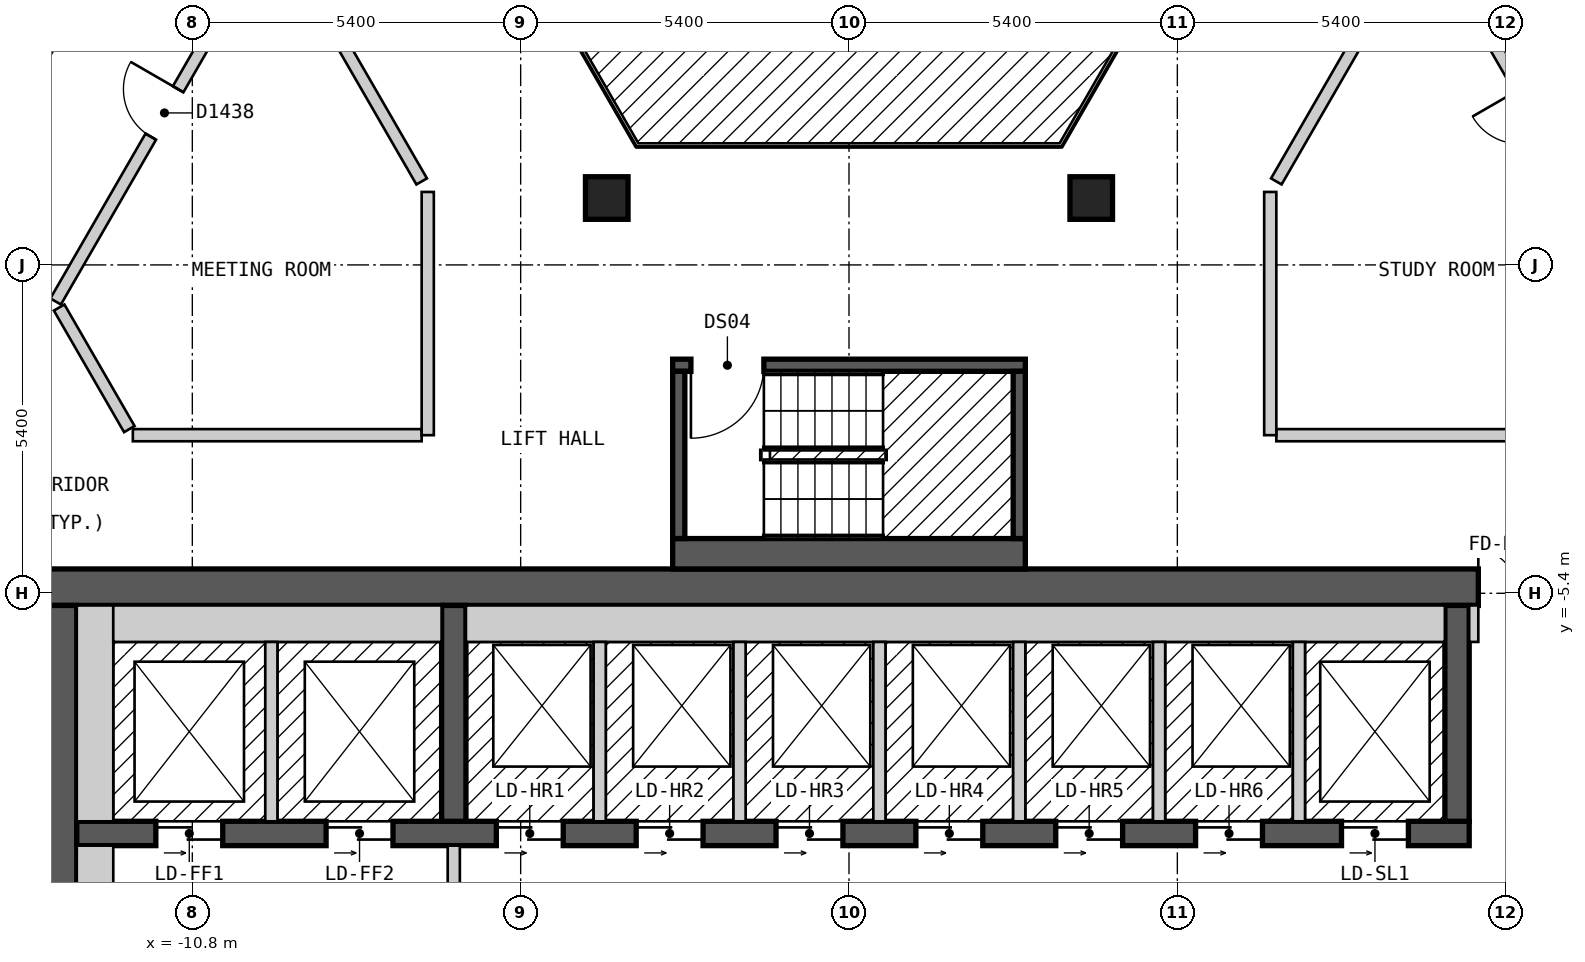
"""IFC4 building model, lengths in metres.
Left out: names, types, materials, properties, quantities, classifications, styles, units other than length and angle.
Written with IfcOpenShell. Run it as: python <this file> out.ifc"""

import sys

from ifc_helpers import new_model, si_unit, direction, frame, frame_2d, origin, origin_2d, place, context, subcontext, project, spatial, rectangle, extrude, element, fill, save


model = new_model("IFC4")
c1 = context("Model", 3, precision=1e-05, world=origin(), true_north=direction((0.0, 1.0)))
c2 = subcontext(c1, "Body", "Model", "MODEL_VIEW")
j1 = project(units=[si_unit("LENGTHUNIT", "METRE"), si_unit("PLANEANGLEUNIT", "RADIAN")], contexts=[c1])
p1 = place(None, origin())
s1 = spatial("IfcSite", under=j1, at=p1, CompositionType="ELEMENT")
p2 = place(p1, origin())
s2 = spatial("IfcBuilding", under=s1, at=p2, CompositionType="ELEMENT")
p3 = place(p2, frame((0.0, 0.0, 178.2)))
s3 = spatial("IfcBuildingStorey", under=s2, at=p3, CompositionType="ELEMENT", Elevation=178.2)
for number, where, z_axis, x_axis in (
    (1, (3.984, 1.1, 0.0), (0.0, 0.0, 1.0), (1.0, 0.0, 0.0)),
    (2, (-3.984, 1.1, 0.0), (0.0, 0.0, 1.0), (1.0, 0.0, 0.0)),
):
    element("IfcColumn", number, at=place(p3, frame(where, z_axis=z_axis, x_axis=x_axis)), inside=s3, PredefinedType="COLUMN", context=c2, shape_type="SweptSolid", body=[
        extrude(rectangle(XDim=0.7, YDim=0.7, at=origin_2d()), origin(), (0.0, 0.0, 1.0), 3.0),
    ])
p4 = place(p3, frame((-13.3, -5.3, 0.0), z_axis=(0.0, 0.0, 1.0), x_axis=(1.0, 0.0, 0.0)))
e3 = element("IfcWall", 3, at=p4, inside=s3, PredefinedType="SHEAR", context=c2, shape_type="SweptSolid", body=[
    extrude(rectangle(XDim=26.6, YDim=0.6, at=frame_2d((13.3, 0.0))), origin(), (0.0, 0.0, 1.0), 2.7),
])
p5 = place(p4, frame((23.65, 0.0, 0.0)))
e4 = element("IfcOpeningElement", 4, at=p5, cuts=e3, PredefinedType="OPENING", context=c2, shape_type="SweptSolid", body=[
    extrude(rectangle(XDim=1.2, YDim=2.1, at=frame_2d((0.6, 1.05))), frame((0.0, 0.31, 0.0), z_axis=(0.0, -1.0, 0.0), x_axis=(1.0, 0.0, 0.0)), (0.0, 0.0, 1.0), 0.62),
])
p6 = place(p3, frame((-13.0, -18.4, 0.0), z_axis=(0.0, 0.0, 1.0), x_axis=(0.0, 1.0, 0.0)))
e5 = element("IfcWall", 5, at=p6, inside=s3, PredefinedType="SHEAR", context=c2, shape_type="SweptSolid", body=[
    extrude(rectangle(XDim=12.8, YDim=0.6, at=frame_2d((6.4, 0.0))), origin(), (0.0, 0.0, 1.0), 2.7),
])
p7 = place(p6, frame((4.2, 0.0, 0.0)))
e6 = element("IfcOpeningElement", 6, at=p7, cuts=e5, PredefinedType="OPENING", context=c2, shape_type="SweptSolid", body=[
    extrude(rectangle(XDim=1.2, YDim=2.1, at=frame_2d((0.6, 1.05))), frame((0.0, 0.31, 0.0), z_axis=(0.0, -1.0, 0.0), x_axis=(1.0, 0.0, 0.0)), (0.0, 0.0, 1.0), 0.62),
])
p8 = place(p3, frame((-12.7, -9.35, 0.0), z_axis=(0.0, 0.0, 1.0), x_axis=(1.0, 0.0, 0.0)))
e7 = element("IfcWall", 7, at=p8, inside=s3, PredefinedType="SHEAR", context=c2, shape_type="SweptSolid", body=[
    extrude(rectangle(XDim=22.9, YDim=0.4, at=frame_2d((11.45, 0.0))), origin(), (0.0, 0.0, 1.0), 2.7),
])
p9 = place(p8, frame((1.3, 0.0, 0.0)))
e8 = element("IfcOpeningElement", 8, at=p9, cuts=e7, PredefinedType="OPENING", context=c2, shape_type="SweptSolid", body=[
    extrude(rectangle(XDim=1.1, YDim=2.1, at=frame_2d((0.55, 1.05))), frame((0.0, 0.21, 0.0), z_axis=(0.0, -1.0, 0.0), x_axis=(1.0, 0.0, 0.0)), (0.0, 0.0, 1.0), 0.42),
])
p10 = place(p8, frame((4.1, 0.0, 0.0)))
e9 = element("IfcOpeningElement", 9, at=p10, cuts=e7, PredefinedType="OPENING", context=c2, shape_type="SweptSolid", body=[
    extrude(rectangle(XDim=1.1, YDim=2.1, at=frame_2d((0.55, 1.05))), frame((0.0, 0.21, 0.0), z_axis=(0.0, -1.0, 0.0), x_axis=(1.0, 0.0, 0.0)), (0.0, 0.0, 1.0), 0.42),
])
p11 = place(p8, frame((6.9, 0.0, 0.0)))
e10 = element("IfcOpeningElement", 10, at=p11, cuts=e7, PredefinedType="OPENING", context=c2, shape_type="SweptSolid", body=[
    extrude(rectangle(XDim=1.1, YDim=2.1, at=frame_2d((0.55, 1.05))), frame((0.0, 0.21, 0.0), z_axis=(0.0, -1.0, 0.0), x_axis=(1.0, 0.0, 0.0)), (0.0, 0.0, 1.0), 0.42),
])
p12 = place(p8, frame((9.2, 0.0, 0.0)))
e11 = element("IfcOpeningElement", 11, at=p12, cuts=e7, PredefinedType="OPENING", context=c2, shape_type="SweptSolid", body=[
    extrude(rectangle(XDim=1.1, YDim=2.1, at=frame_2d((0.55, 1.05))), frame((0.0, 0.21, 0.0), z_axis=(0.0, -1.0, 0.0), x_axis=(1.0, 0.0, 0.0)), (0.0, 0.0, 1.0), 0.42),
])
p13 = place(p8, frame((11.5, 0.0, 0.0)))
e12 = element("IfcOpeningElement", 12, at=p13, cuts=e7, PredefinedType="OPENING", context=c2, shape_type="SweptSolid", body=[
    extrude(rectangle(XDim=1.1, YDim=2.1, at=frame_2d((0.55, 1.05))), frame((0.0, 0.21, 0.0), z_axis=(0.0, -1.0, 0.0), x_axis=(1.0, 0.0, 0.0)), (0.0, 0.0, 1.0), 0.42),
])
p14 = place(p8, frame((13.8, 0.0, 0.0)))
e13 = element("IfcOpeningElement", 13, at=p14, cuts=e7, PredefinedType="OPENING", context=c2, shape_type="SweptSolid", body=[
    extrude(rectangle(XDim=1.1, YDim=2.1, at=frame_2d((0.55, 1.05))), frame((0.0, 0.21, 0.0), z_axis=(0.0, -1.0, 0.0), x_axis=(1.0, 0.0, 0.0)), (0.0, 0.0, 1.0), 0.42),
])
p15 = place(p8, frame((16.1, 0.0, 0.0)))
e14 = element("IfcOpeningElement", 14, at=p15, cuts=e7, PredefinedType="OPENING", context=c2, shape_type="SweptSolid", body=[
    extrude(rectangle(XDim=1.1, YDim=2.1, at=frame_2d((0.55, 1.05))), frame((0.0, 0.21, 0.0), z_axis=(0.0, -1.0, 0.0), x_axis=(1.0, 0.0, 0.0)), (0.0, 0.0, 1.0), 0.42),
])
p16 = place(p8, frame((18.4, 0.0, 0.0)))
e15 = element("IfcOpeningElement", 15, at=p16, cuts=e7, PredefinedType="OPENING", context=c2, shape_type="SweptSolid", body=[
    extrude(rectangle(XDim=1.1, YDim=2.1, at=frame_2d((0.55, 1.05))), frame((0.0, 0.21, 0.0), z_axis=(0.0, -1.0, 0.0), x_axis=(1.0, 0.0, 0.0)), (0.0, 0.0, 1.0), 0.42),
])
p17 = place(p8, frame((20.8, 0.0, 0.0)))
e16 = element("IfcOpeningElement", 16, at=p17, cuts=e7, PredefinedType="OPENING", context=c2, shape_type="SweptSolid", body=[
    extrude(rectangle(XDim=1.1, YDim=2.1, at=frame_2d((0.55, 1.05))), frame((0.0, 0.21, 0.0), z_axis=(0.0, -1.0, 0.0), x_axis=(1.0, 0.0, 0.0)), (0.0, 0.0, 1.0), 0.42),
])
for number, where, z_axis, x_axis in (
    (17, (-6.5, -9.15, 0.0), (0.0, 0.0, 1.0), (0.0, 1.0, 0.0)),
    (18, (10.0, -9.15, 0.0), (0.0, 0.0, 1.0), (0.0, 1.0, 0.0)),
):
    element("IfcWall", number, at=place(p3, frame(where, z_axis=z_axis, x_axis=x_axis)), inside=s3, PredefinedType="SHEAR", context=c2, shape_type="SweptSolid", body=[
        extrude(rectangle(XDim=3.55, YDim=0.4, at=frame_2d((1.775, 0.0))), origin(), (0.0, 0.0, 1.0), 2.7),
    ])
p18 = place(p3, frame((-2.9, -4.75, 0.0), z_axis=(0.0, 0.0, 1.0), x_axis=(1.0, 0.0, 0.0)))
e19 = element("IfcWall", 19, at=p18, inside=s3, PredefinedType="SOLIDWALL", context=c2, shape_type="SweptSolid", body=[
    extrude(rectangle(XDim=5.8, YDim=0.5, at=frame_2d((2.9, 0.0))), origin(), (0.0, 0.0, 1.0), 2.7),
])
p19 = place(p3, frame((-2.9, -1.65, 0.0), z_axis=(0.0, 0.0, 1.0), x_axis=(1.0, 0.0, 0.0)))
e20 = element("IfcWall", 20, at=p19, inside=s3, PredefinedType="SOLIDWALL", context=c2, shape_type="SweptSolid", body=[
    extrude(rectangle(XDim=5.8, YDim=0.2, at=frame_2d((2.9, 0.0))), origin(), (0.0, 0.0, 1.0), 2.7),
])
p20 = place(p19, frame((0.3, 0.0, 0.0)))
e21 = element("IfcOpeningElement", 21, at=p20, cuts=e20, PredefinedType="OPENING", context=c2, shape_type="SweptSolid", body=[
    extrude(rectangle(XDim=1.2, YDim=2.1, at=frame_2d((0.6, 1.05))), frame((0.0, 0.11, 0.0), z_axis=(0.0, -1.0, 0.0), x_axis=(1.0, 0.0, 0.0)), (0.0, 0.0, 1.0), 0.22),
])
for number, where, z_axis, x_axis in (
    (22, (-2.8, -4.5, 0.0), (0.0, 0.0, 1.0), (0.0, 1.0, 0.0)),
    (23, (2.8, -4.5, 0.0), (0.0, 0.0, 1.0), (0.0, 1.0, 0.0)),
):
    element("IfcWall", number, at=place(p3, frame(where, z_axis=z_axis, x_axis=x_axis)), inside=s3, PredefinedType="SOLIDWALL", context=c2, shape_type="SweptSolid", body=[
        extrude(rectangle(XDim=2.75, YDim=0.2, at=frame_2d((1.375, 0.0))), origin(), (0.0, 0.0, 1.0), 2.7),
    ])
p21 = place(p3, frame((-9.411, 5.5, 0.0), z_axis=(0.0, 0.0, 1.0), x_axis=(0.500018099276, -0.86601495391, 0.0)))
e24 = element("IfcWall", 24, at=p21, inside=s3, PredefinedType="PARTITIONING", context=c2, shape_type="SweptSolid", body=[
    extrude(rectangle(XDim=4.765, YDim=0.2, at=frame_2d((2.383, 0.0))), origin(), (0.0, 0.0, 1.0), 2.7),
])
p22 = place(p3, frame((-12.99, -0.701, 0.0), z_axis=(0.0, 0.0, 1.0), x_axis=(0.499972710878, -0.866041158593, 0.0)))
e25 = element("IfcWall", 25, at=p22, inside=s3, PredefinedType="PARTITIONING", context=c2, shape_type="SweptSolid", body=[
    extrude(rectangle(XDim=2.308, YDim=0.2, at=frame_2d((1.154, 0.0))), origin(), (0.0, 0.0, 1.0), 2.7),
])
p23 = place(p3, frame((9.469, 5.6, 0.0), z_axis=(0.0, 0.0, 1.0), x_axis=(0.499964524401, -0.866045884662, 0.0)))
e26 = element("IfcWall", 26, at=p23, inside=s3, PredefinedType="PARTITIONING", context=c2, shape_type="SweptSolid", body=[
    extrude(rectangle(XDim=7.042, YDim=0.2, at=frame_2d((3.521, 0.0))), origin(), (0.0, 0.0, 1.0), 2.7),
])
p24 = place(p23, frame((3.129, 0.0, 0.0)))
e27 = element("IfcOpeningElement", 27, at=p24, cuts=e26, PredefinedType="OPENING", context=c2, shape_type="SweptSolid", body=[
    extrude(rectangle(XDim=0.9, YDim=2.1, at=frame_2d((0.45, 1.05))), frame((0.0, 0.11, 0.0), z_axis=(0.0, -1.0, 0.0), x_axis=(1.0, 0.0, 0.0)), (0.0, 0.0, 1.0), 0.22),
])
p25 = place(p3, frame((10.739, 7.8, 0.0), z_axis=(0.0, 0.0, 1.0), x_axis=(0.499964311759, -0.86604600742, 0.0)))
e28 = element("IfcWall", 28, at=p25, inside=s3, PredefinedType="PARTITIONING", context=c2, shape_type="SweptSolid", body=[
    extrude(rectangle(XDim=9.583, YDim=0.2, at=frame_2d((4.792, 0.0))), origin(), (0.0, 0.0, 1.0), 2.7),
])
p26 = place(p3, frame((-11.778, -2.8, 0.0), z_axis=(0.0, 0.0, 1.0), x_axis=(1.0, 0.0, 0.0)))
e29 = element("IfcWall", 29, at=p26, inside=s3, PredefinedType="PARTITIONING", context=c2, shape_type="SweptSolid", body=[
    extrude(rectangle(XDim=4.75, YDim=0.2, at=frame_2d((2.375, 0.0))), origin(), (0.0, 0.0, 1.0), 2.7),
])
p27 = place(p3, frame((7.028, -2.8, 0.0), z_axis=(0.0, 0.0, 1.0), x_axis=(1.0, 0.0, 0.0)))
e30 = element("IfcWall", 30, at=p27, inside=s3, PredefinedType="PARTITIONING", context=c2, shape_type="SweptSolid", body=[
    extrude(rectangle(XDim=4.634, YDim=0.2, at=frame_2d((2.317, 0.0))), origin(), (0.0, 0.0, 1.0), 2.7),
])
p28 = place(p3, frame((7.028, 1.373, 0.0), z_axis=(0.0, 0.0, 1.0), x_axis=(0.499953126767, 0.866052464367, 0.0)))
e31 = element("IfcWall", 31, at=p28, inside=s3, PredefinedType="PARTITIONING", context=c2, shape_type="SweptSolid", body=[
    extrude(rectangle(XDim=4.764, YDim=0.2, at=frame_2d((2.382, 0.0))), origin(), (0.0, 0.0, 1.0), 2.7),
])
p29 = place(p3, frame((-13.048, -0.601, 0.0), z_axis=(0.0, 0.0, 1.0), x_axis=(0.499982180423, 0.866035691677, 0.0)))
e32 = element("IfcWall", 32, at=p29, inside=s3, PredefinedType="PARTITIONING", context=c2, shape_type="SweptSolid", body=[
    extrude(rectangle(XDim=7.16, YDim=0.2, at=frame_2d((3.58, 0.0))), origin(), (0.0, 0.0, 1.0), 2.7),
])
p30 = place(p29, frame((3.13, 0.0, 0.0)))
e33 = element("IfcOpeningElement", 33, at=p30, cuts=e32, PredefinedType="OPENING", context=c2, shape_type="SweptSolid", body=[
    extrude(rectangle(XDim=0.9, YDim=2.1, at=frame_2d((0.45, 1.05))), frame((0.0, 0.11, 0.0), z_axis=(0.0, -1.0, 0.0), x_axis=(1.0, 0.0, 0.0)), (0.0, 0.0, 1.0), 0.22),
])
p31 = place(p3, frame((-15.53, -0.501, 0.0), z_axis=(0.0, 0.0, 1.0), x_axis=(0.499952498232, 0.866052827206, 0.0)))
e34 = element("IfcWall", 34, at=p31, inside=s3, PredefinedType="PARTITIONING", context=c2, shape_type="SweptSolid", body=[
    extrude(rectangle(XDim=9.585, YDim=0.2, at=frame_2d((4.792, 0.0))), origin(), (0.0, 0.0, 1.0), 2.7),
])
for number, where, z_axis, x_axis in (
    (35, (6.928, -2.8, 0.0), (0.0, 0.0, 1.0), (0.0, 1.0, 0.0)),
    (36, (-6.928, -2.8, 0.0), (0.0, 0.0, 1.0), (0.0, 1.0, 0.0)),
):
    element("IfcWall", number, at=place(p3, frame(where, z_axis=z_axis, x_axis=x_axis)), inside=s3, PredefinedType="PARTITIONING", context=c2, shape_type="SweptSolid", body=[
        extrude(rectangle(XDim=4.0, YDim=0.2, at=frame_2d((2.0, 0.0))), origin(), (0.0, 0.0, 1.0), 2.7),
    ])
p32 = place(p3, frame((-12.4, -13.0, 0.0), z_axis=(0.0, 0.0, 1.0), x_axis=(0.0, 1.0, 0.0)))
e37 = element("IfcWall", 37, at=p32, inside=s3, PredefinedType="PARTITIONING", context=c2, shape_type="SweptSolid", body=[
    extrude(rectangle(XDim=3.45, YDim=0.6, at=frame_2d((1.725, 0.0))), origin(), (0.0, 0.0, 1.0), 2.7),
])
p33 = place(p3, frame((-12.4, -9.15, 0.0), z_axis=(0.0, 0.0, 1.0), x_axis=(0.0, 1.0, 0.0)))
e38 = element("IfcWall", 38, at=p33, inside=s3, PredefinedType="SOLIDWALL", context=c2, shape_type="SweptSolid", body=[
    extrude(rectangle(XDim=3.55, YDim=0.6, at=frame_2d((1.775, 0.0))), origin(), (0.0, 0.0, 1.0), 2.7),
])
p34 = place(p3, frame((-12.1, -5.9, 0.0), z_axis=(0.0, 0.0, 1.0), x_axis=(1.0, 0.0, 0.0)))
e39 = element("IfcWall", 39, at=p34, inside=s3, PredefinedType="SOLIDWALL", context=c2, shape_type="SweptSolid", body=[
    extrude(rectangle(XDim=5.4, YDim=0.6, at=frame_2d((2.7, 0.0))), origin(), (0.0, 0.0, 1.0), 2.7),
])
p35 = place(p3, frame((-9.5, -9.15, 0.0), z_axis=(0.0, 0.0, 1.0), x_axis=(0.0, 1.0, 0.0)))
e40 = element("IfcWall", 40, at=p35, inside=s3, PredefinedType="SOLIDWALL", context=c2, shape_type="SweptSolid", body=[
    extrude(rectangle(XDim=2.95, YDim=0.2, at=frame_2d((1.475, 0.0))), origin(), (0.0, 0.0, 1.0), 2.7),
])
p36 = place(p3, frame((-6.5, -14.45, 0.0), z_axis=(0.0, 0.0, 1.0), x_axis=(0.0, 1.0, 0.0)))
e41 = element("IfcWall", 41, at=p36, inside=s3, PredefinedType="PARTITIONING", context=c2, shape_type="SweptSolid", body=[
    extrude(rectangle(XDim=4.9, YDim=0.2, at=frame_2d((2.45, 0.0))), origin(), (0.0, 0.0, 1.0), 2.7),
])
p37 = place(p36, frame((3.15, 0.0, 0.0), z_axis=(0.0, 0.0, 1.0), x_axis=(-1.0, 0.0, 0.0)))
e42 = element("IfcOpeningElement", 42, at=p37, cuts=e41, PredefinedType="OPENING", context=c2, shape_type="SweptSolid", body=[
    extrude(rectangle(XDim=1.4, YDim=2.1, at=frame_2d((0.7, 1.05))), frame((0.0, 0.11, 0.0), z_axis=(0.0, -1.0, 0.0), x_axis=(1.0, 0.0, 0.0)), (0.0, 0.0, 1.0), 0.22),
])
p38 = place(p3, frame((-6.3, -5.9, 0.0), z_axis=(0.0, 0.0, 1.0), x_axis=(1.0, 0.0, 0.0)))
e43 = element("IfcWall", 43, at=p38, inside=s3, PredefinedType="SOLIDWALL", context=c2, shape_type="SweptSolid", body=[
    extrude(rectangle(XDim=16.1, YDim=0.6, at=frame_2d((8.05, 0.0))), origin(), (0.0, 0.0, 1.0), 2.7),
])
for number, where, z_axis, x_axis in (
    (44, (-4.1, -9.15, 0.0), (0.0, 0.0, 1.0), (0.0, 1.0, 0.0)),
    (45, (-1.8, -9.15, 0.0), (0.0, 0.0, 1.0), (0.0, 1.0, 0.0)),
    (46, (0.5, -9.15, 0.0), (0.0, 0.0, 1.0), (0.0, 1.0, 0.0)),
    (47, (2.8, -9.15, 0.0), (0.0, 0.0, 1.0), (0.0, 1.0, 0.0)),
    (48, (5.1, -9.15, 0.0), (0.0, 0.0, 1.0), (0.0, 1.0, 0.0)),
    (49, (7.4, -9.15, 0.0), (0.0, 0.0, 1.0), (0.0, 1.0, 0.0)),
):
    element("IfcWall", number, at=place(p3, frame(where, z_axis=z_axis, x_axis=x_axis)), inside=s3, PredefinedType="SOLIDWALL", context=c2, shape_type="SweptSolid", body=[
        extrude(rectangle(XDim=2.95, YDim=0.2, at=frame_2d((1.475, 0.0))), origin(), (0.0, 0.0, 1.0), 2.7),
    ])
p39 = place(p3, frame((10.275, -6.2, 0.0), z_axis=(0.0, 0.0, 1.0), x_axis=(0.0, 1.0, 0.0)))
e50 = element("IfcWall", 50, at=p39, inside=s3, PredefinedType="PARTITIONING", context=c2, shape_type="SweptSolid", body=[
    extrude(rectangle(XDim=0.6, YDim=0.15, at=frame_2d((0.3, 0.0))), origin(), (0.0, 0.0, 1.0), 2.7),
])
p40 = place(p20, origin())
e51 = element("IfcDoor", 51, at=p40, inside=s3, OperationType="SINGLE_SWING_LEFT", PredefinedType="DOOR", context=c2, shape_type="SweptSolid", body=[
    extrude(rectangle(XDim=1.2, YDim=2.1, at=frame_2d((0.6, 1.05))), frame((0.0, 0.025, 0.0), z_axis=(0.0, -1.0, 0.0), x_axis=(1.0, 0.0, 0.0)), (0.0, 0.0, 1.0), 0.05),
])
fill(e21, e51)
p41 = place(p30, origin())
e52 = element("IfcDoor", 52, at=p41, inside=s3, OperationType="SINGLE_SWING_RIGHT", PredefinedType="DOOR", context=c2, shape_type="SweptSolid", body=[
    extrude(rectangle(XDim=0.9, YDim=2.1, at=frame_2d((0.45, 1.05))), frame((0.0, 0.025, 0.0), z_axis=(0.0, -1.0, 0.0), x_axis=(1.0, 0.0, 0.0)), (0.0, 0.0, 1.0), 0.05),
])
fill(e33, e52)
p42 = place(p9, origin())
e53 = element("IfcDoor", 53, at=p42, inside=s3, OperationType="DOUBLE_DOOR_SLIDING", PredefinedType="DOOR", context=c2, shape_type="SweptSolid", body=[
    extrude(rectangle(XDim=1.1, YDim=2.1, at=frame_2d((0.55, 1.05))), frame((0.0, 0.025, 0.0), z_axis=(0.0, -1.0, 0.0), x_axis=(1.0, 0.0, 0.0)), (0.0, 0.0, 1.0), 0.05),
])
fill(e8, e53)
p43 = place(p10, origin())
e54 = element("IfcDoor", 54, at=p43, inside=s3, OperationType="DOUBLE_DOOR_SLIDING", PredefinedType="DOOR", context=c2, shape_type="SweptSolid", body=[
    extrude(rectangle(XDim=1.1, YDim=2.1, at=frame_2d((0.55, 1.05))), frame((0.0, 0.025, 0.0), z_axis=(0.0, -1.0, 0.0), x_axis=(1.0, 0.0, 0.0)), (0.0, 0.0, 1.0), 0.05),
])
fill(e9, e54)
p44 = place(p11, origin())
e55 = element("IfcDoor", 55, at=p44, inside=s3, OperationType="DOUBLE_DOOR_SLIDING", PredefinedType="DOOR", context=c2, shape_type="SweptSolid", body=[
    extrude(rectangle(XDim=1.1, YDim=2.1, at=frame_2d((0.55, 1.05))), frame((0.0, 0.025, 0.0), z_axis=(0.0, -1.0, 0.0), x_axis=(1.0, 0.0, 0.0)), (0.0, 0.0, 1.0), 0.05),
])
fill(e10, e55)
p45 = place(p12, origin())
e56 = element("IfcDoor", 56, at=p45, inside=s3, OperationType="DOUBLE_DOOR_SLIDING", PredefinedType="DOOR", context=c2, shape_type="SweptSolid", body=[
    extrude(rectangle(XDim=1.1, YDim=2.1, at=frame_2d((0.55, 1.05))), frame((0.0, 0.025, 0.0), z_axis=(0.0, -1.0, 0.0), x_axis=(1.0, 0.0, 0.0)), (0.0, 0.0, 1.0), 0.05),
])
fill(e11, e56)
p46 = place(p13, origin())
e57 = element("IfcDoor", 57, at=p46, inside=s3, OperationType="DOUBLE_DOOR_SLIDING", PredefinedType="DOOR", context=c2, shape_type="SweptSolid", body=[
    extrude(rectangle(XDim=1.1, YDim=2.1, at=frame_2d((0.55, 1.05))), frame((0.0, 0.025, 0.0), z_axis=(0.0, -1.0, 0.0), x_axis=(1.0, 0.0, 0.0)), (0.0, 0.0, 1.0), 0.05),
])
fill(e12, e57)
p47 = place(p14, origin())
e58 = element("IfcDoor", 58, at=p47, inside=s3, OperationType="DOUBLE_DOOR_SLIDING", PredefinedType="DOOR", context=c2, shape_type="SweptSolid", body=[
    extrude(rectangle(XDim=1.1, YDim=2.1, at=frame_2d((0.55, 1.05))), frame((0.0, 0.025, 0.0), z_axis=(0.0, -1.0, 0.0), x_axis=(1.0, 0.0, 0.0)), (0.0, 0.0, 1.0), 0.05),
])
fill(e13, e58)
p48 = place(p15, origin())
e59 = element("IfcDoor", 59, at=p48, inside=s3, OperationType="DOUBLE_DOOR_SLIDING", PredefinedType="DOOR", context=c2, shape_type="SweptSolid", body=[
    extrude(rectangle(XDim=1.1, YDim=2.1, at=frame_2d((0.55, 1.05))), frame((0.0, 0.025, 0.0), z_axis=(0.0, -1.0, 0.0), x_axis=(1.0, 0.0, 0.0)), (0.0, 0.0, 1.0), 0.05),
])
fill(e14, e59)
p49 = place(p16, origin())
e60 = element("IfcDoor", 60, at=p49, inside=s3, OperationType="DOUBLE_DOOR_SLIDING", PredefinedType="DOOR", context=c2, shape_type="SweptSolid", body=[
    extrude(rectangle(XDim=1.1, YDim=2.1, at=frame_2d((0.55, 1.05))), frame((0.0, 0.025, 0.0), z_axis=(0.0, -1.0, 0.0), x_axis=(1.0, 0.0, 0.0)), (0.0, 0.0, 1.0), 0.05),
])
fill(e15, e60)
p50 = place(p17, origin())
e61 = element("IfcDoor", 61, at=p50, inside=s3, OperationType="DOUBLE_DOOR_SLIDING", PredefinedType="DOOR", context=c2, shape_type="SweptSolid", body=[
    extrude(rectangle(XDim=1.1, YDim=2.1, at=frame_2d((0.55, 1.05))), frame((0.0, 0.025, 0.0), z_axis=(0.0, -1.0, 0.0), x_axis=(1.0, 0.0, 0.0)), (0.0, 0.0, 1.0), 0.05),
])
fill(e16, e61)
p51 = place(p5, origin())
e62 = element("IfcDoor", 62, at=p51, inside=s3, OperationType="DOUBLE_DOOR_SINGLE_SWING", PredefinedType="DOOR", context=c2, shape_type="SweptSolid", body=[
    extrude(rectangle(XDim=1.2, YDim=2.1, at=frame_2d((0.6, 1.05))), frame((0.0, 0.025, 0.0), z_axis=(0.0, -1.0, 0.0), x_axis=(1.0, 0.0, 0.0)), (0.0, 0.0, 1.0), 0.05),
])
fill(e4, e62)
save(model, sys.argv[1])
